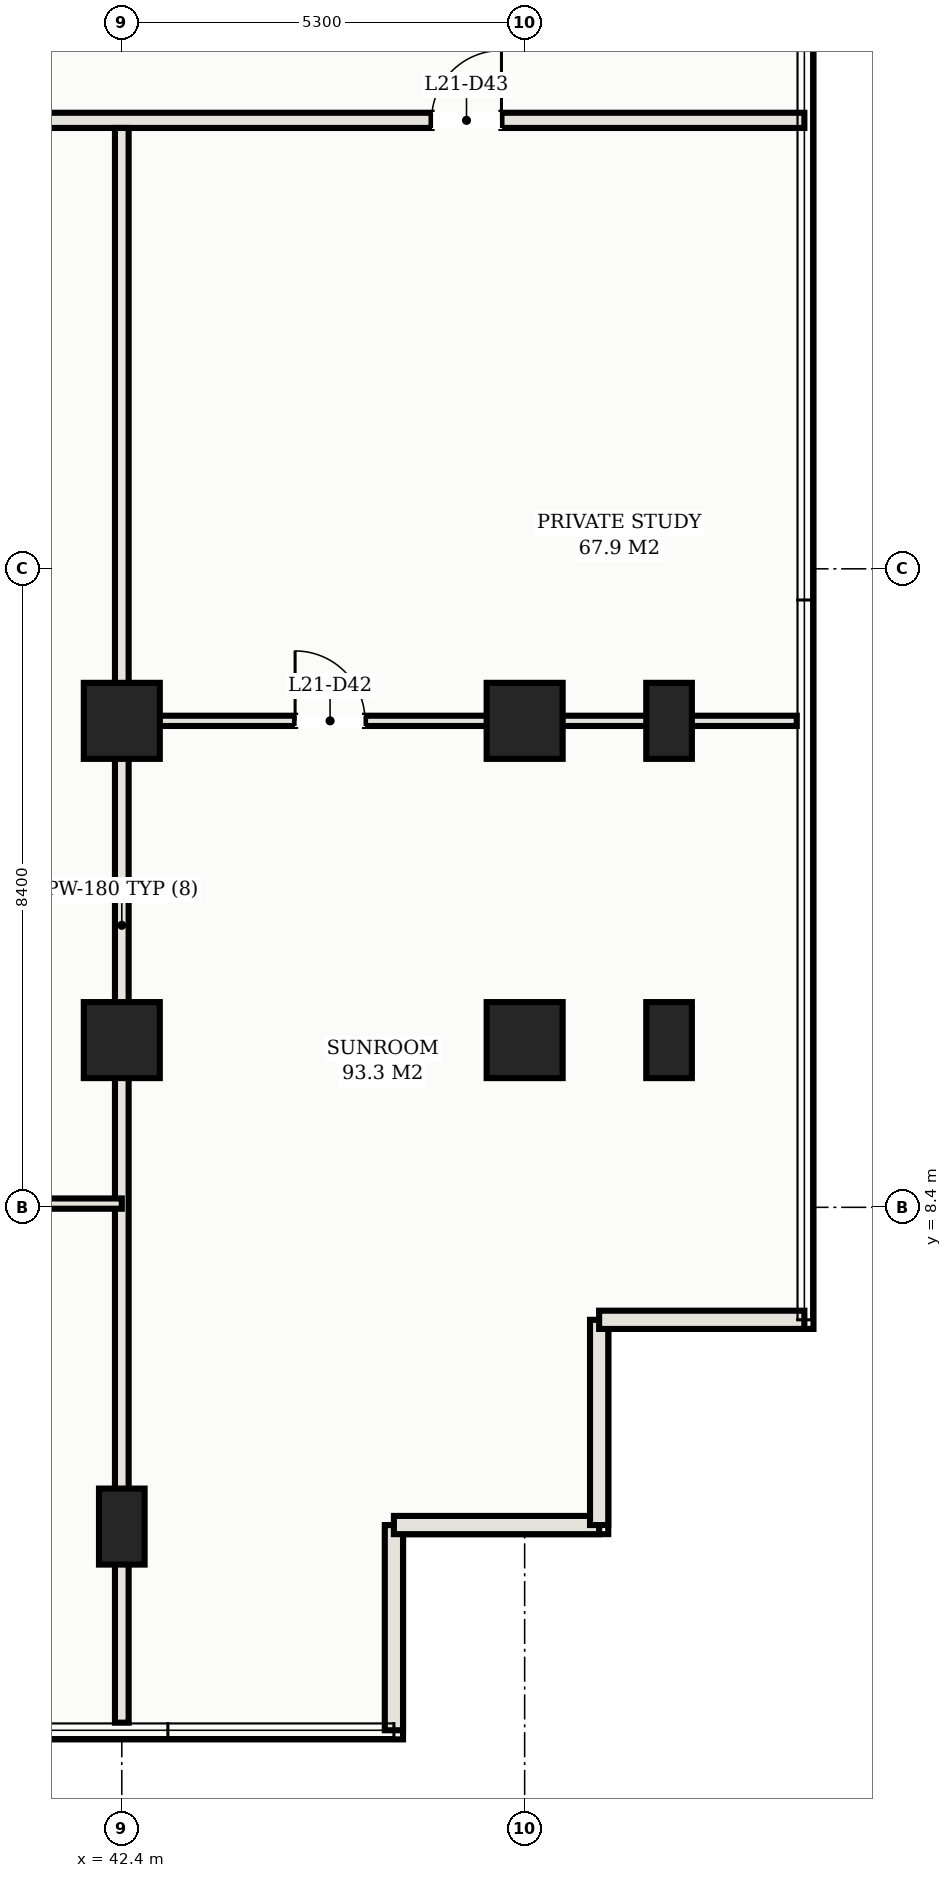
"""IFC4 building model, lengths in metres.
Left out: names, types, materials, properties, quantities, classifications, styles, units other than length and angle.
Written with IfcOpenShell. Run it as: python <this file> out.ifc"""

import sys

from ifc_helpers import new_model, si_unit, direction, frame, frame_2d, origin, origin_2d, place, context, subcontext, project, spatial, rectangle, hollow_rectangle, extrude, element, fill, save


model = new_model("IFC4")
c1 = context("Model", 3, precision=1e-05, world=origin(), true_north=direction((0.0, 1.0)))
c2 = subcontext(c1, "Body", "Model", "MODEL_VIEW")
j1 = project(units=[si_unit("LENGTHUNIT", "METRE"), si_unit("PLANEANGLEUNIT", "RADIAN")], contexts=[c1])
p1 = place(None, origin())
s1 = spatial("IfcSite", under=j1, at=p1, CompositionType="ELEMENT")
p2 = place(p1, origin())
s2 = spatial("IfcBuilding", under=s1, at=p2, CompositionType="ELEMENT")
p3 = place(p2, frame((0.0, 0.0, 81.7)))
s3 = spatial("IfcBuildingStorey", under=s2, at=p3, CompositionType="ELEMENT", Elevation=81.7)
for number, where, z_axis, x_axis in (
    (1, (42.4, 14.8, 0.0), (0.0, 0.0, 1.0), (1.0, 0.0, 0.0)),
    (2, (42.4, 10.6, 0.0), (0.0, 0.0, 1.0), (1.0, 0.0, 0.0)),
):
    element("IfcColumn", number, at=place(p3, frame(where, z_axis=z_axis, x_axis=x_axis)), inside=s3, PredefinedType="COLUMN", context=c2, shape_type="SweptSolid", body=[
        extrude(hollow_rectangle(XDim=1.0, YDim=1.0, WallThickness=0.036, at=origin_2d()), origin(), (0.0, 0.0, 1.0), 3.3),
    ])
p4 = place(p3, frame((42.4, 4.2, 0.0), z_axis=(0.0, 0.0, 1.0), x_axis=(1.0, 0.0, 0.0)))
e3 = element("IfcColumn", 3, at=p4, inside=s3, PredefinedType="COLUMN", context=c2, shape_type="SweptSolid", body=[
    extrude(hollow_rectangle(XDim=0.6, YDim=1.0, WallThickness=0.032, at=origin_2d()), origin(), (0.0, 0.0, 1.0), 3.3),
])
for number, where, z_axis, x_axis in (
    (4, (47.7, 10.6, 0.0), (0.0, 0.0, 1.0), (1.0, 0.0, 0.0)),
    (5, (47.7, 14.8, 0.0), (0.0, 0.0, 1.0), (1.0, 0.0, 0.0)),
):
    element("IfcColumn", number, at=place(p3, frame(where, z_axis=z_axis, x_axis=x_axis)), inside=s3, PredefinedType="COLUMN", context=c2, shape_type="SweptSolid", body=[
        extrude(hollow_rectangle(XDim=1.0, YDim=1.0, WallThickness=0.036, at=origin_2d()), origin(), (0.0, 0.0, 1.0), 3.3),
    ])
for number, where, z_axis, x_axis in (
    (6, (49.6, 10.6, 0.0), (0.0, 0.0, 1.0), (1.0, 0.0, 0.0)),
    (7, (49.6, 14.8, 0.0), (0.0, 0.0, 1.0), (1.0, 0.0, 0.0)),
):
    element("IfcColumn", number, at=place(p3, frame(where, z_axis=z_axis, x_axis=x_axis)), inside=s3, PredefinedType="COLUMN", context=c2, shape_type="SweptSolid", body=[
        extrude(hollow_rectangle(XDim=0.6, YDim=1.0, WallThickness=0.032, at=origin_2d()), origin(), (0.0, 0.0, 1.0), 3.3),
    ])
for number, where, z_axis, x_axis in (
    (8, (45.98, 1.52, 0.0), (0.0, 0.0, 1.0), (0.0, 1.0, 0.0)),
    (9, (45.98, 4.22, 0.0), (0.0, 0.0, 1.0), (1.0, 0.0, 0.0)),
    (10, (48.68, 4.22, 0.0), (0.0, 0.0, 1.0), (0.0, 1.0, 0.0)),
    (11, (48.68, 6.92, 0.0), (0.0, 0.0, 1.0), (1.0, 0.0, 0.0)),
):
    element("IfcWall", number, at=place(p3, frame(where, z_axis=z_axis, x_axis=x_axis)), inside=s3, PredefinedType="SOLIDWALL", context=c2, shape_type="SweptSolid", body=[
        extrude(rectangle(XDim=2.7, YDim=0.24, at=frame_2d((1.35, 0.0))), origin(), (0.0, 0.0, 1.0), 3.09),
    ])
p5 = place(p3, frame((1.62, 22.7, 0.0), z_axis=(0.0, 0.0, 1.0), x_axis=(1.0, 0.0, 0.0)))
e12 = element("IfcWall", 12, at=p5, inside=s3, PredefinedType="PARTITIONING", context=c2, shape_type="SweptSolid", body=[
    extrude(rectangle(XDim=49.76, YDim=0.2, at=frame_2d((24.88, 0.0))), origin(), (0.0, 0.0, 1.0), 2.38),
])
p6 = place(p5, frame((9.73, 0.0, 0.0)))
e13 = element("IfcOpeningElement", 13, at=p6, cuts=e12, PredefinedType="OPENING", context=c2, shape_type="SweptSolid", body=[
    extrude(rectangle(XDim=1.1, YDim=2.25, at=frame_2d((0.55, 1.125))), frame((0.0, 0.11, 0.0), z_axis=(0.0, -1.0, 0.0), x_axis=(1.0, 0.0, 0.0)), (0.0, 0.0, 1.0), 0.22),
])
p7 = place(p5, frame((15.03, 0.0, 0.0)))
e14 = element("IfcOpeningElement", 14, at=p7, cuts=e12, PredefinedType="OPENING", context=c2, shape_type="SweptSolid", body=[
    extrude(rectangle(XDim=1.1, YDim=2.25, at=frame_2d((0.55, 1.125))), frame((0.0, 0.11, 0.0), z_axis=(0.0, -1.0, 0.0), x_axis=(1.0, 0.0, 0.0)), (0.0, 0.0, 1.0), 0.22),
])
p8 = place(p5, frame((20.33, 0.0, 0.0)))
e15 = element("IfcOpeningElement", 15, at=p8, cuts=e12, PredefinedType="OPENING", context=c2, shape_type="SweptSolid", body=[
    extrude(rectangle(XDim=1.1, YDim=2.25, at=frame_2d((0.55, 1.125))), frame((0.0, 0.11, 0.0), z_axis=(0.0, -1.0, 0.0), x_axis=(1.0, 0.0, 0.0)), (0.0, 0.0, 1.0), 0.22),
])
p9 = place(p5, frame((25.63, 0.0, 0.0)))
e16 = element("IfcOpeningElement", 16, at=p9, cuts=e12, PredefinedType="OPENING", context=c2, shape_type="SweptSolid", body=[
    extrude(rectangle(XDim=1.1, YDim=2.25, at=frame_2d((0.55, 1.125))), frame((0.0, 0.11, 0.0), z_axis=(0.0, -1.0, 0.0), x_axis=(1.0, 0.0, 0.0)), (0.0, 0.0, 1.0), 0.22),
])
p10 = place(p5, frame((33.33, 0.0, 0.0)))
e17 = element("IfcOpeningElement", 17, at=p10, cuts=e12, PredefinedType="OPENING", context=c2, shape_type="SweptSolid", body=[
    extrude(rectangle(XDim=1.1, YDim=2.25, at=frame_2d((0.55, 1.125))), frame((0.0, 0.11, 0.0), z_axis=(0.0, -1.0, 0.0), x_axis=(1.0, 0.0, 0.0)), (0.0, 0.0, 1.0), 0.22),
])
p11 = place(p5, frame((3.985, 0.0, 0.0)))
e18 = element("IfcOpeningElement", 18, at=p11, cuts=e12, PredefinedType="OPENING", context=c2, shape_type="SweptSolid", body=[
    extrude(rectangle(XDim=0.92, YDim=2.15, at=frame_2d((0.46, 1.075))), frame((0.0, 0.11, 0.0), z_axis=(0.0, -1.0, 0.0), x_axis=(1.0, 0.0, 0.0)), (0.0, 0.0, 1.0), 0.22),
])
p12 = place(p5, frame((44.855, 0.0, 0.0)))
e19 = element("IfcOpeningElement", 19, at=p12, cuts=e12, PredefinedType="OPENING", context=c2, shape_type="SweptSolid", body=[
    extrude(rectangle(XDim=0.92, YDim=2.15, at=frame_2d((0.46, 1.075))), frame((0.0, 0.11, 0.0), z_axis=(0.0, -1.0, 0.0), x_axis=(1.0, 0.0, 0.0)), (0.0, 0.0, 1.0), 0.22),
])
p13 = place(p3, frame((42.4, 1.62, 0.0), z_axis=(0.0, 0.0, 1.0), x_axis=(0.0, 1.0, 0.0)))
e20 = element("IfcWall", 20, at=p13, inside=s3, PredefinedType="PARTITIONING", context=c2, shape_type="SweptSolid", body=[
    extrude(rectangle(XDim=20.98, YDim=0.18, at=frame_2d((10.49, 0.0))), origin(), (0.0, 0.0, 1.0), 2.335),
])
p14 = place(p3, frame((34.2, 8.449, 0.0), z_axis=(0.0, 0.0, 1.0), x_axis=(1.0, 0.0, 0.0)))
e21 = element("IfcWall", 21, at=p14, inside=s3, PredefinedType="PARTITIONING", context=c2, shape_type="SweptSolid", body=[
    extrude(rectangle(XDim=8.2, YDim=0.135, at=frame_2d((4.1, 0.0))), origin(), (0.0, 0.0, 1.0), 2.38),
])
p15 = place(p14, frame((0.615, 0.0, 0.0)))
e22 = element("IfcOpeningElement", 22, at=p15, cuts=e21, PredefinedType="OPENING", context=c2, shape_type="SweptSolid", body=[
    extrude(rectangle(XDim=0.92, YDim=2.15, at=frame_2d((0.46, 1.075))), frame((0.0, 0.078, 0.0), z_axis=(0.0, -1.0, 0.0), x_axis=(1.0, 0.0, 0.0)), (0.0, 0.0, 1.0), 0.155),
])
p16 = place(p3, frame((42.4, 14.8, 0.0), z_axis=(0.0, 0.0, 1.0), x_axis=(1.0, 0.0, 0.0)))
e23 = element("IfcWall", 23, at=p16, inside=s3, PredefinedType="PARTITIONING", context=c2, shape_type="SweptSolid", body=[
    extrude(rectangle(XDim=8.88, YDim=0.135, at=frame_2d((4.44, 0.0))), origin(), (0.0, 0.0, 1.0), 2.335),
])
p17 = place(p16, frame((2.28, 0.0, 0.0)))
e24 = element("IfcOpeningElement", 24, at=p17, cuts=e23, PredefinedType="OPENING", context=c2, shape_type="SweptSolid", body=[
    extrude(rectangle(XDim=0.92, YDim=2.15, at=frame_2d((0.46, 1.075))), frame((0.0, 0.078, 0.0), z_axis=(0.0, -1.0, 0.0), x_axis=(1.0, 0.0, 0.0)), (0.0, 0.0, 1.0), 0.155),
])
p18 = place(p17, origin())
e25 = element("IfcDoor", 25, at=p18, inside=s3, OperationType="SINGLE_SWING_LEFT", PredefinedType="DOOR", context=c2, shape_type="SweptSolid", body=[
    extrude(rectangle(XDim=0.92, YDim=2.15, at=frame_2d((0.46, 1.075))), frame((0.0, 0.025, 0.0), z_axis=(0.0, -1.0, 0.0), x_axis=(1.0, 0.0, 0.0)), (0.0, 0.0, 1.0), 0.05),
])
fill(e24, e25)
p19 = place(p12, origin())
e26 = element("IfcDoor", 26, at=p19, inside=s3, OperationType="SINGLE_SWING_RIGHT", PredefinedType="DOOR", context=c2, shape_type="SweptSolid", body=[
    extrude(rectangle(XDim=0.92, YDim=2.15, at=frame_2d((0.46, 1.075))), frame((0.0, 0.025, 0.0), z_axis=(0.0, -1.0, 0.0), x_axis=(1.0, 0.0, 0.0)), (0.0, 0.0, 1.0), 0.05),
])
fill(e19, e26)
save(model, sys.argv[1])
